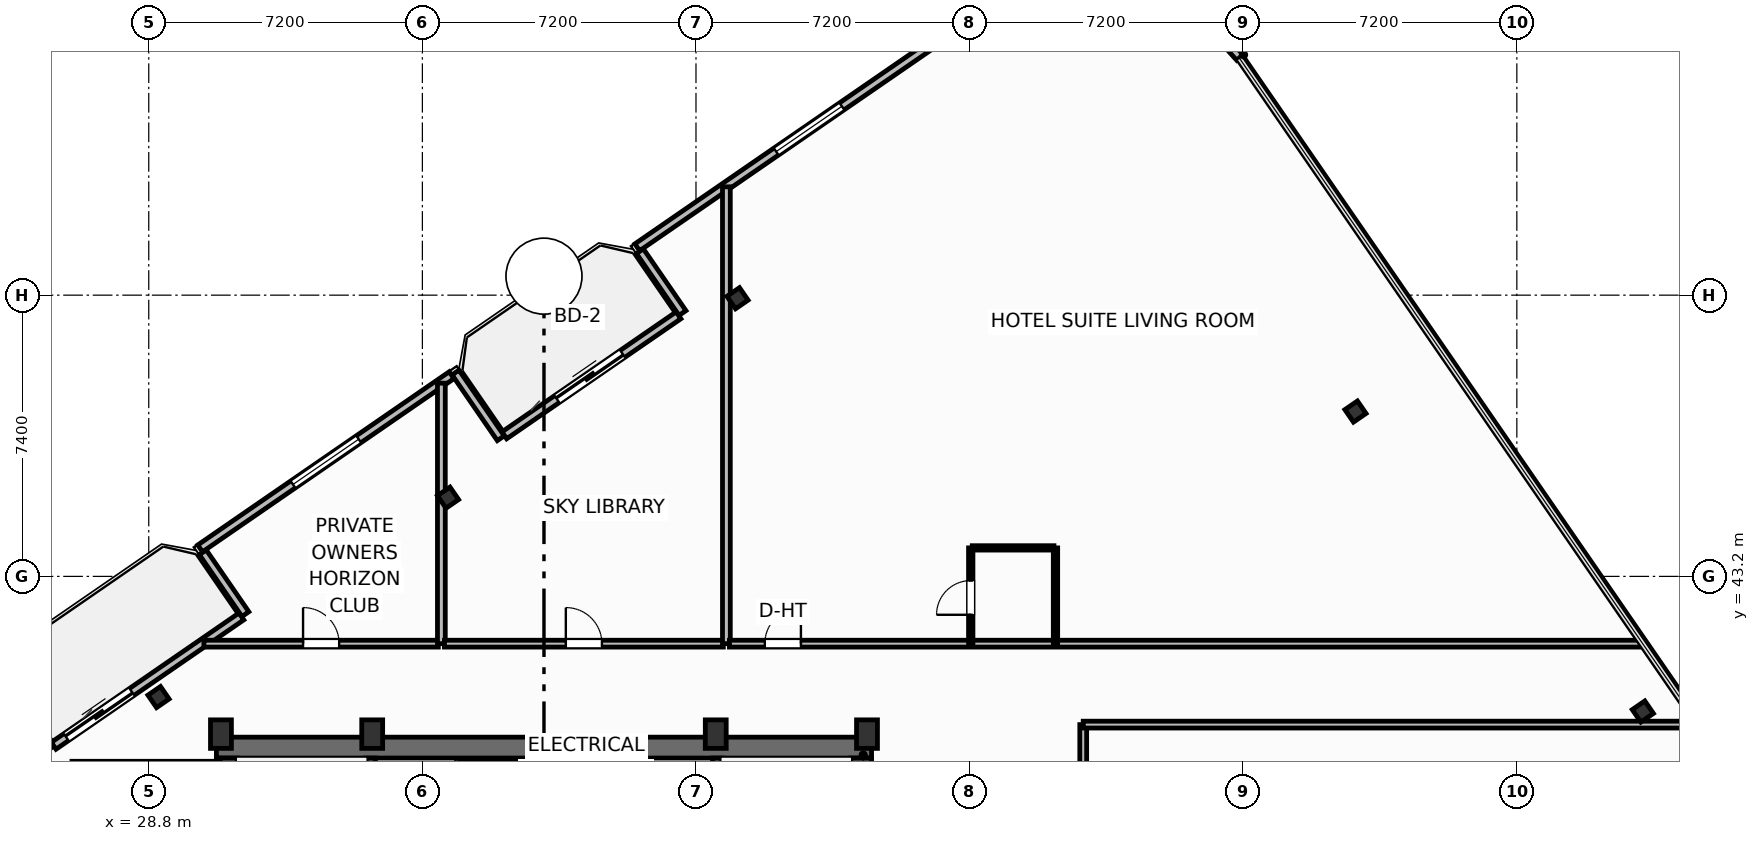
"""IFC4 building model, lengths in metres.
Left out: names, types, materials, properties, quantities, classifications, styles, units other than length and angle.
Written with IfcOpenShell. Run it as: python <this file> out.ifc"""

import sys

from ifc_helpers import new_model, si_unit, direction, frame, frame_2d, origin, origin_2d, place, context, subcontext, project, spatial, rectangle, i_section, extrude, element, fill, save


model = new_model("IFC4")
c1 = context("Model", 3, precision=1e-05, world=origin(), true_north=direction((0.0, 1.0)))
c2 = subcontext(c1, "Body", "Model", "MODEL_VIEW")
j1 = project(units=[si_unit("LENGTHUNIT", "METRE"), si_unit("PLANEANGLEUNIT", "RADIAN")], contexts=[c1])
p1 = place(None, origin())
s1 = spatial("IfcSite", under=j1, at=p1, CompositionType="ELEMENT")
p2 = place(p1, origin())
s2 = spatial("IfcBuilding", under=s1, at=p2, CompositionType="ELEMENT")
p3 = place(p2, frame((0.0, 0.0, 265.6)))
s3 = spatial("IfcBuildingStorey", under=s2, at=p3, CompositionType="ELEMENT", Elevation=265.6)
for number, where, z_axis, x_axis in (
    (1, (30.7, 39.05, 0.0), (0.0, 0.0, 1.0), (1.0, 0.0, 0.0)),
    (2, (34.68, 39.05, 0.0), (0.0, 0.0, 1.0), (1.0, 0.0, 0.0)),
    (3, (43.72, 39.05, 0.0), (0.0, 0.0, 1.0), (1.0, 0.0, 0.0)),
    (4, (47.7, 39.05, 0.0), (0.0, 0.0, 1.0), (1.0, 0.0, 0.0)),
):
    element("IfcColumn", number, at=place(p3, frame(where, z_axis=z_axis, x_axis=x_axis)), inside=s3, PredefinedType="COLUMN", context=c2, shape_type="SweptSolid", body=[
        extrude(rectangle(XDim=0.55, YDim=0.75, at=origin_2d()), origin(), (0.0, 0.0, 1.0), 3.7),
    ])
p4 = place(p3, frame((30.58, 38.695, 0.0), z_axis=(0.0, 0.0, 1.0), x_axis=(1.0, 0.0, 0.0)))
e5 = element("IfcWall", 5, at=p4, inside=s3, PredefinedType="SHEAR", context=c2, shape_type="SweptSolid", body=[
    extrude(rectangle(XDim=17.24, YDim=0.55, at=frame_2d((8.62, 0.0))), origin(), (0.0, 0.0, 1.0), 3.45),
])
for number, where, z_axis, x_axis in (
    (6, (30.855, 29.2, 0.0), (0.0, 0.0, 1.0), (0.0, 1.0, 0.0)),
    (7, (47.545, 29.2, 0.0), (0.0, 0.0, 1.0), (0.0, 1.0, 0.0)),
):
    element("IfcWall", number, at=place(p3, frame(where, z_axis=z_axis, x_axis=x_axis)), inside=s3, PredefinedType="SHEAR", context=c2, shape_type="SweptSolid", body=[
        extrude(rectangle(XDim=9.22, YDim=0.55, at=frame_2d((4.61, 0.0))), origin(), (0.0, 0.0, 1.0), 3.45),
    ])
p5 = place(p3, frame((34.64, 29.2, 0.0), z_axis=(0.0, 0.0, 1.0), x_axis=(0.0, 1.0, 0.0)))
e8 = element("IfcWall", 8, at=p5, inside=s3, PredefinedType="SHEAR", context=c2, shape_type="SweptSolid", body=[
    extrude(rectangle(XDim=9.22, YDim=0.25, at=frame_2d((4.61, 0.0))), origin(), (0.0, 0.0, 1.0), 3.45),
])
p6 = place(p5, frame((0.65, 0.0, 0.0)))
e9 = element("IfcOpeningElement", 9, at=p6, cuts=e8, PredefinedType="OPENING", context=c2, shape_type="SweptSolid", body=[
    extrude(rectangle(XDim=1.05, YDim=2.15, at=frame_2d((0.525, 1.075))), frame((0.0, 0.135, 0.0), z_axis=(0.0, -1.0, 0.0), x_axis=(1.0, 0.0, 0.0)), (0.0, 0.0, 1.0), 0.27),
])
p7 = place(p3, frame((43.76, 29.2, 0.0), z_axis=(0.0, 0.0, 1.0), x_axis=(0.0, 1.0, 0.0)))
e10 = element("IfcWall", 10, at=p7, inside=s3, PredefinedType="SHEAR", context=c2, shape_type="SweptSolid", body=[
    extrude(rectangle(XDim=9.22, YDim=0.25, at=frame_2d((4.61, 0.0))), origin(), (0.0, 0.0, 1.0), 3.45),
])
p8 = place(p7, frame((0.65, 0.0, 0.0)))
e11 = element("IfcOpeningElement", 11, at=p8, cuts=e10, PredefinedType="OPENING", context=c2, shape_type="SweptSolid", body=[
    extrude(rectangle(XDim=1.05, YDim=2.15, at=frame_2d((0.525, 1.075))), frame((0.0, 0.135, 0.0), z_axis=(0.0, -1.0, 0.0), x_axis=(1.0, 0.0, 0.0)), (0.0, 0.0, 1.0), 0.27),
])
for number, where, z_axis, x_axis in (
    (12, (68.115, 39.644, 0.0), (0.0, 0.0, 1.0), (0.824, 0.567, 0.0)),
    (13, (60.554, 47.537, 0.0), (0.0, 0.0, 1.0), (0.824, 0.567, 0.0)),
    (14, (44.292, 50.519, 0.0), (0.0, 0.0, 1.0), (0.824, 0.567, 0.0)),
    (15, (36.675, 45.272, 0.0), (0.0, 0.0, 1.0), (0.824, 0.567, 0.0)),
    (16, (29.057, 40.025, 0.0), (0.0, 0.0, 1.0), (0.824, 0.567, 0.0)),
):
    element("IfcColumn", number, at=place(p3, frame(where, z_axis=z_axis, x_axis=x_axis)), inside=s3, PredefinedType="COLUMN", context=c2, shape_type="SweptSolid", body=[
        extrude(i_section(OverallWidth=0.401, OverallDepth=0.399, WebThickness=0.025, FlangeThickness=0.04, FilletRadius=0.022, at=origin_2d()), origin(), (0.0, 0.0, 1.0), 3.7),
    ])
p9 = place(p3, frame((26.297, 38.743, 0.0), z_axis=(0.0, 0.0, 1.0), x_axis=(0.823534636215, 0.567265989598, 0.0)))
e17 = element("IfcWall", 17, at=p9, inside=s3, PredefinedType="SOLIDWALL", context=c2, shape_type="SweptSolid", body=[
    extrude(rectangle(XDim=6.0, YDim=0.22, at=frame_2d((3.0, 0.0))), origin(), (0.0, 0.0, 1.0), 2.73),
])
p10 = place(p9, frame((0.4, 0.0, 0.0)))
e18 = element("IfcOpeningElement", 18, at=p10, cuts=e17, PredefinedType="OPENING", context=c2, shape_type="SweptSolid", body=[
    extrude(rectangle(XDim=2.1, YDim=2.3, at=frame_2d((1.05, 1.15))), frame((0.0, 0.12, 0.0), z_axis=(0.0, -1.0, 0.0), x_axis=(1.0, 0.0, 0.0)), (0.0, 0.0, 1.0), 0.24),
])
p11 = place(p3, frame((38.156, 46.912, 0.0), z_axis=(0.0, 0.0, 1.0), x_axis=(0.823527178548, 0.567276816195, 0.0)))
e19 = element("IfcWall", 19, at=p11, inside=s3, PredefinedType="SOLIDWALL", context=c2, shape_type="SweptSolid", body=[
    extrude(rectangle(XDim=5.567, YDim=0.22, at=frame_2d((2.783, 0.0))), origin(), (0.0, 0.0, 1.0), 2.73),
])
p12 = place(p11, frame((1.68, 0.0, 0.0)))
e20 = element("IfcOpeningElement", 20, at=p12, cuts=e19, PredefinedType="OPENING", context=c2, shape_type="SweptSolid", body=[
    extrude(rectangle(XDim=2.1, YDim=2.3, at=frame_2d((1.05, 1.15))), frame((0.0, 0.12, 0.0), z_axis=(0.0, -1.0, 0.0), x_axis=(1.0, 0.0, 0.0)), (0.0, 0.0, 1.0), 0.24),
])
p13 = place(p3, frame((57.51, 56.855, 0.0), z_axis=(0.0, 0.0, 1.0), x_axis=(-0.669853727156, 0.742493086982, 0.0)))
e21 = element("IfcWall", 21, at=p13, inside=s3, PredefinedType="SOLIDWALL", context=c2, shape_type="SweptSolid", body=[
    extrude(rectangle(XDim=1.274, YDim=0.22, at=frame_2d((0.637, 0.0))), origin(), (0.0, 0.0, 1.0), 2.73),
])
p14 = place(p3, frame((50.697, 58.087, 0.0), z_axis=(0.0, 0.0, 1.0), x_axis=(-0.823539455464, -0.567258993137, 0.0)))
e22 = element("IfcWall", 22, at=p14, inside=s3, PredefinedType="SOLIDWALL", context=c2, shape_type="SweptSolid", body=[
    extrude(rectangle(XDim=10.98, YDim=0.22, at=frame_2d((5.49, 0.0))), origin(), (0.0, 0.0, 1.0), 2.73),
])
p15 = place(p14, frame((4.44, 0.0, 0.8)))
e23 = element("IfcOpeningElement", 23, at=p15, cuts=e22, PredefinedType="OPENING", context=c2, shape_type="SweptSolid", body=[
    extrude(rectangle(XDim=2.1, YDim=1.75, at=frame_2d((1.05, 0.875))), frame((0.0, 0.12, 0.0), z_axis=(0.0, -1.0, 0.0), x_axis=(1.0, 0.0, 0.0)), (0.0, 0.0, 1.0), 0.24),
])
p16 = place(p3, frame((41.725, 51.756, 0.0), z_axis=(0.0, 0.0, 1.0), x_axis=(0.567273565974, -0.823529417415, 0.0)))
e24 = element("IfcWall", 24, at=p16, inside=s3, PredefinedType="SOLIDWALL", context=c2, shape_type="SweptSolid", body=[
    extrude(rectangle(XDim=1.975, YDim=0.22, at=frame_2d((0.988, 0.0))), origin(), (0.0, 0.0, 1.0), 2.73),
])
p17 = place(p3, frame((38.063, 46.835, 0.0), z_axis=(0.0, 0.0, 1.0), x_axis=(-0.567219383419, 0.823566737474, 0.0)))
e25 = element("IfcWall", 25, at=p17, inside=s3, PredefinedType="SOLIDWALL", context=c2, shape_type="SweptSolid", body=[
    extrude(rectangle(XDim=2.1, YDim=0.22, at=frame_2d((1.05, 0.0))), origin(), (0.0, 0.0, 1.0), 2.73),
])
p18 = place(p3, frame((36.769, 48.494, 0.0), z_axis=(0.0, 0.0, 1.0), x_axis=(-0.823521165086, -0.56728554596, 0.0)))
e26 = element("IfcWall", 26, at=p18, inside=s3, PredefinedType="SOLIDWALL", context=c2, shape_type="SweptSolid", body=[
    extrude(rectangle(XDim=8.035, YDim=0.22, at=frame_2d((4.018, 0.0))), origin(), (0.0, 0.0, 1.0), 2.73),
])
p19 = place(p18, frame((2.968, 0.0, 0.8)))
e27 = element("IfcOpeningElement", 27, at=p19, cuts=e26, PredefinedType="OPENING", context=c2, shape_type="SweptSolid", body=[
    extrude(rectangle(XDim=2.1, YDim=1.75, at=frame_2d((1.05, 0.875))), frame((0.0, 0.12, 0.0), z_axis=(0.0, -1.0, 0.0), x_axis=(1.0, 0.0, 0.0)), (0.0, 0.0, 1.0), 0.24),
])
p20 = place(p3, frame((30.223, 43.833, 0.0), z_axis=(0.0, 0.0, 1.0), x_axis=(0.567215821234, -0.823569190865, 0.0)))
e28 = element("IfcWall", 28, at=p20, inside=s3, PredefinedType="SOLIDWALL", context=c2, shape_type="SweptSolid", body=[
    extrude(rectangle(XDim=1.975, YDim=0.22, at=frame_2d((0.988, 0.0))), origin(), (0.0, 0.0, 1.0), 2.73),
])
p21 = place(p3, frame((26.204, 38.667, 0.0), z_axis=(0.0, 0.0, 1.0), x_axis=(-0.567219383419, 0.823566737474, 0.0)))
e29 = element("IfcWall", 29, at=p21, inside=s3, PredefinedType="SOLIDWALL", context=c2, shape_type="SweptSolid", body=[
    extrude(rectangle(XDim=2.1, YDim=0.22, at=frame_2d((1.05, 0.0))), origin(), (0.0, 0.0, 1.0), 2.73),
])
p22 = place(p3, frame((30.251, 41.43, 0.0), z_axis=(0.0, 0.0, 1.0), x_axis=(1.0, 0.0, 0.0)))
e30 = element("IfcWall", 30, at=p22, inside=s3, PredefinedType="PARTITIONING", context=c2, shape_type="SweptSolid", body=[
    extrude(rectangle(XDim=6.169, YDim=0.18, at=frame_2d((3.084, 0.0))), origin(), (0.0, 0.0, 1.0), 3.45),
])
p23 = place(p22, frame((2.609, 0.0, 0.0)))
e31 = element("IfcOpeningElement", 31, at=p23, cuts=e30, PredefinedType="OPENING", context=c2, shape_type="SweptSolid", body=[
    extrude(rectangle(XDim=0.95, YDim=2.05, at=frame_2d((0.475, 1.025))), frame((0.0, 0.1, 0.0), z_axis=(0.0, -1.0, 0.0), x_axis=(1.0, 0.0, 0.0)), (0.0, 0.0, 1.0), 0.2),
])
p24 = place(p3, frame((36.5, 41.43, 0.0), z_axis=(0.0, 0.0, 1.0), x_axis=(0.0, 1.0, 0.0)))
e32 = element("IfcWall", 32, at=p24, inside=s3, PredefinedType="PARTITIONING", context=c2, shape_type="SweptSolid", body=[
    extrude(rectangle(XDim=6.854, YDim=0.205, at=frame_2d((3.427, 0.0))), origin(), (0.0, 0.0, 1.0), 2.739),
])
p25 = place(p3, frame((36.58, 41.43, 0.0), z_axis=(0.0, 0.0, 1.0), x_axis=(1.0, 0.0, 0.0)))
e33 = element("IfcWall", 33, at=p25, inside=s3, PredefinedType="PARTITIONING", context=c2, shape_type="SweptSolid", body=[
    extrude(rectangle(XDim=7.34, YDim=0.18, at=frame_2d((3.67, 0.0))), origin(), (0.0, 0.0, 1.0), 3.45),
])
p26 = place(p25, frame((3.195, 0.0, 0.0)))
e34 = element("IfcOpeningElement", 34, at=p26, cuts=e33, PredefinedType="OPENING", context=c2, shape_type="SweptSolid", body=[
    extrude(rectangle(XDim=0.95, YDim=2.05, at=frame_2d((0.475, 1.025))), frame((0.0, 0.1, 0.0), z_axis=(0.0, -1.0, 0.0), x_axis=(1.0, 0.0, 0.0)), (0.0, 0.0, 1.0), 0.2),
])
p27 = place(p3, frame((44.0, 41.43, 0.0), z_axis=(0.0, 0.0, 1.0), x_axis=(0.0, 1.0, 0.0)))
e35 = element("IfcWall", 35, at=p27, inside=s3, PredefinedType="PARTITIONING", context=c2, shape_type="SweptSolid", body=[
    extrude(rectangle(XDim=12.021, YDim=0.205, at=frame_2d((6.01, 0.0))), origin(), (0.0, 0.0, 1.0), 2.739),
])
p28 = place(p3, frame((44.08, 41.43, 0.0), z_axis=(0.0, 0.0, 1.0), x_axis=(1.0, 0.0, 0.0)))
e36 = element("IfcWall", 36, at=p28, inside=s3, PredefinedType="PARTITIONING", context=c2, shape_type="SweptSolid", body=[
    extrude(rectangle(XDim=23.992, YDim=0.18, at=frame_2d((11.996, 0.0))), origin(), (0.0, 0.0, 1.0), 3.45),
])
p29 = place(p28, frame((0.931, 0.0, 0.0)))
e37 = element("IfcOpeningElement", 37, at=p29, cuts=e36, PredefinedType="OPENING", context=c2, shape_type="SweptSolid", body=[
    extrude(rectangle(XDim=0.95, YDim=2.15, at=frame_2d((0.475, 1.075))), frame((0.0, 0.1, 0.0), z_axis=(0.0, -1.0, 0.0), x_axis=(1.0, 0.0, 0.0)), (0.0, 0.0, 1.0), 0.2),
])
p30 = place(p3, frame((50.47, 43.95, 0.0), z_axis=(0.0, 0.0, 1.0), x_axis=(1.0, 0.0, 0.0)))
e38 = element("IfcWall", 38, at=p30, inside=s3, PredefinedType="PARTITIONING", context=c2, shape_type="SweptSolid", body=[
    extrude(rectangle(XDim=2.15, YDim=0.115, at=frame_2d((1.075, 0.0))), origin(), (0.0, 0.0, 1.0), 3.45),
])
p31 = place(p3, frame((50.43, 41.43, 0.0), z_axis=(0.0, 0.0, 1.0), x_axis=(0.0, 1.0, 0.0)))
e39 = element("IfcWall", 39, at=p31, inside=s3, PredefinedType="PARTITIONING", context=c2, shape_type="SweptSolid", body=[
    extrude(rectangle(XDim=2.52, YDim=0.115, at=frame_2d((1.26, 0.0))), origin(), (0.0, 0.0, 1.0), 3.45),
])
p32 = place(p31, frame((0.76, 0.0, 0.0)))
e40 = element("IfcOpeningElement", 40, at=p32, cuts=e39, PredefinedType="OPENING", context=c2, shape_type="SweptSolid", body=[
    extrude(rectangle(XDim=0.9, YDim=2.05, at=frame_2d((0.45, 1.025))), frame((0.0, 0.067, 0.0), z_axis=(0.0, -1.0, 0.0), x_axis=(1.0, 0.0, 0.0)), (0.0, 0.0, 1.0), 0.135),
])
p33 = place(p3, frame((52.66, 41.43, 0.0), z_axis=(0.0, 0.0, 1.0), x_axis=(0.0, 1.0, 0.0)))
e41 = element("IfcWall", 41, at=p33, inside=s3, PredefinedType="PARTITIONING", context=c2, shape_type="SweptSolid", body=[
    extrude(rectangle(XDim=2.52, YDim=0.115, at=frame_2d((1.26, 0.0))), origin(), (0.0, 0.0, 1.0), 3.45),
])
p34 = place(p3, frame((53.39, 19.24, 0.0), z_axis=(0.0, 0.0, 1.0), x_axis=(0.0, 1.0, 0.0)))
e42 = element("IfcWall", 42, at=p34, inside=s3, PredefinedType="PARTITIONING", context=c2, shape_type="SweptSolid", body=[
    extrude(rectangle(XDim=20.06, YDim=0.18, at=frame_2d((10.03, 0.0))), origin(), (0.0, 0.0, 1.0), 3.45),
])
p35 = place(p34, frame((7.7, 0.0, 0.0)))
e43 = element("IfcOpeningElement", 43, at=p35, cuts=e42, PredefinedType="OPENING", context=c2, shape_type="SweptSolid", body=[
    extrude(rectangle(XDim=0.95, YDim=2.05, at=frame_2d((0.475, 1.025))), frame((0.0, 0.1, 0.0), z_axis=(0.0, -1.0, 0.0), x_axis=(1.0, 0.0, 0.0)), (0.0, 0.0, 1.0), 0.2),
])
p36 = place(p3, frame((53.39, 39.3, 0.0), z_axis=(0.0, 0.0, 1.0), x_axis=(1.0, 0.0, 0.0)))
e44 = element("IfcWall", 44, at=p36, inside=s3, PredefinedType="PARTITIONING", context=c2, shape_type="SweptSolid", body=[
    extrude(rectangle(XDim=16.149, YDim=0.18, at=frame_2d((8.075, 0.0))), origin(), (0.0, 0.0, 1.0), 2.739),
])
p37 = place(p10, origin())
e45 = element("IfcDoor", 45, at=p37, inside=s3, OperationType="SLIDING_TO_LEFT", PredefinedType="DOOR", context=c2, shape_type="SweptSolid", body=[
    extrude(rectangle(XDim=2.1, YDim=2.3, at=frame_2d((1.05, 1.15))), frame((0.0, 0.025, 0.0), z_axis=(0.0, -1.0, 0.0), x_axis=(1.0, 0.0, 0.0)), (0.0, 0.0, 1.0), 0.05),
])
fill(e18, e45)
p38 = place(p12, origin())
e46 = element("IfcDoor", 46, at=p38, inside=s3, OperationType="SLIDING_TO_LEFT", PredefinedType="DOOR", context=c2, shape_type="SweptSolid", body=[
    extrude(rectangle(XDim=2.1, YDim=2.3, at=frame_2d((1.05, 1.15))), frame((0.0, 0.025, 0.0), z_axis=(0.0, -1.0, 0.0), x_axis=(1.0, 0.0, 0.0)), (0.0, 0.0, 1.0), 0.05),
])
fill(e20, e46)
p39 = place(p15, origin())
e47 = element("IfcWindow", 47, at=p39, inside=s3, PartitioningType="SINGLE_PANEL", PredefinedType="WINDOW", context=c2, shape_type="SweptSolid", body=[
    extrude(rectangle(XDim=2.1, YDim=1.75, at=frame_2d((1.05, 0.875))), frame((0.0, 0.03, 0.0), z_axis=(0.0, -1.0, 0.0), x_axis=(1.0, 0.0, 0.0)), (0.0, 0.0, 1.0), 0.06),
])
fill(e23, e47)
p40 = place(p19, origin())
e48 = element("IfcWindow", 48, at=p40, inside=s3, PartitioningType="SINGLE_PANEL", PredefinedType="WINDOW", context=c2, shape_type="SweptSolid", body=[
    extrude(rectangle(XDim=2.1, YDim=1.75, at=frame_2d((1.05, 0.875))), frame((0.0, 0.03, 0.0), z_axis=(0.0, -1.0, 0.0), x_axis=(1.0, 0.0, 0.0)), (0.0, 0.0, 1.0), 0.06),
])
fill(e27, e48)
p41 = place(p23, origin())
e49 = element("IfcDoor", 49, at=p41, inside=s3, OperationType="SINGLE_SWING_LEFT", PredefinedType="DOOR", context=c2, shape_type="SweptSolid", body=[
    extrude(rectangle(XDim=0.95, YDim=2.05, at=frame_2d((0.475, 1.025))), frame((0.0, 0.025, 0.0), z_axis=(0.0, -1.0, 0.0), x_axis=(1.0, 0.0, 0.0)), (0.0, 0.0, 1.0), 0.05),
])
fill(e31, e49)
p42 = place(p26, origin())
e50 = element("IfcDoor", 50, at=p42, inside=s3, OperationType="SINGLE_SWING_LEFT", PredefinedType="DOOR", context=c2, shape_type="SweptSolid", body=[
    extrude(rectangle(XDim=0.95, YDim=2.05, at=frame_2d((0.475, 1.025))), frame((0.0, 0.025, 0.0), z_axis=(0.0, -1.0, 0.0), x_axis=(1.0, 0.0, 0.0)), (0.0, 0.0, 1.0), 0.05),
])
fill(e34, e50)
p43 = place(p29, origin())
e51 = element("IfcDoor", 51, at=p43, inside=s3, OperationType="SINGLE_SWING_RIGHT", PredefinedType="DOOR", context=c2, shape_type="SweptSolid", body=[
    extrude(rectangle(XDim=0.95, YDim=2.15, at=frame_2d((0.475, 1.075))), frame((0.0, 0.025, 0.0), z_axis=(0.0, -1.0, 0.0), x_axis=(1.0, 0.0, 0.0)), (0.0, 0.0, 1.0), 0.05),
])
fill(e37, e51)
p44 = place(p32, origin())
e52 = element("IfcDoor", 52, at=p44, inside=s3, OperationType="SINGLE_SWING_LEFT", PredefinedType="DOOR", context=c2, shape_type="SweptSolid", body=[
    extrude(rectangle(XDim=0.9, YDim=2.05, at=frame_2d((0.45, 1.025))), frame((0.0, 0.025, 0.0), z_axis=(0.0, -1.0, 0.0), x_axis=(1.0, 0.0, 0.0)), (0.0, 0.0, 1.0), 0.05),
])
fill(e40, e52)
save(model, sys.argv[1])
